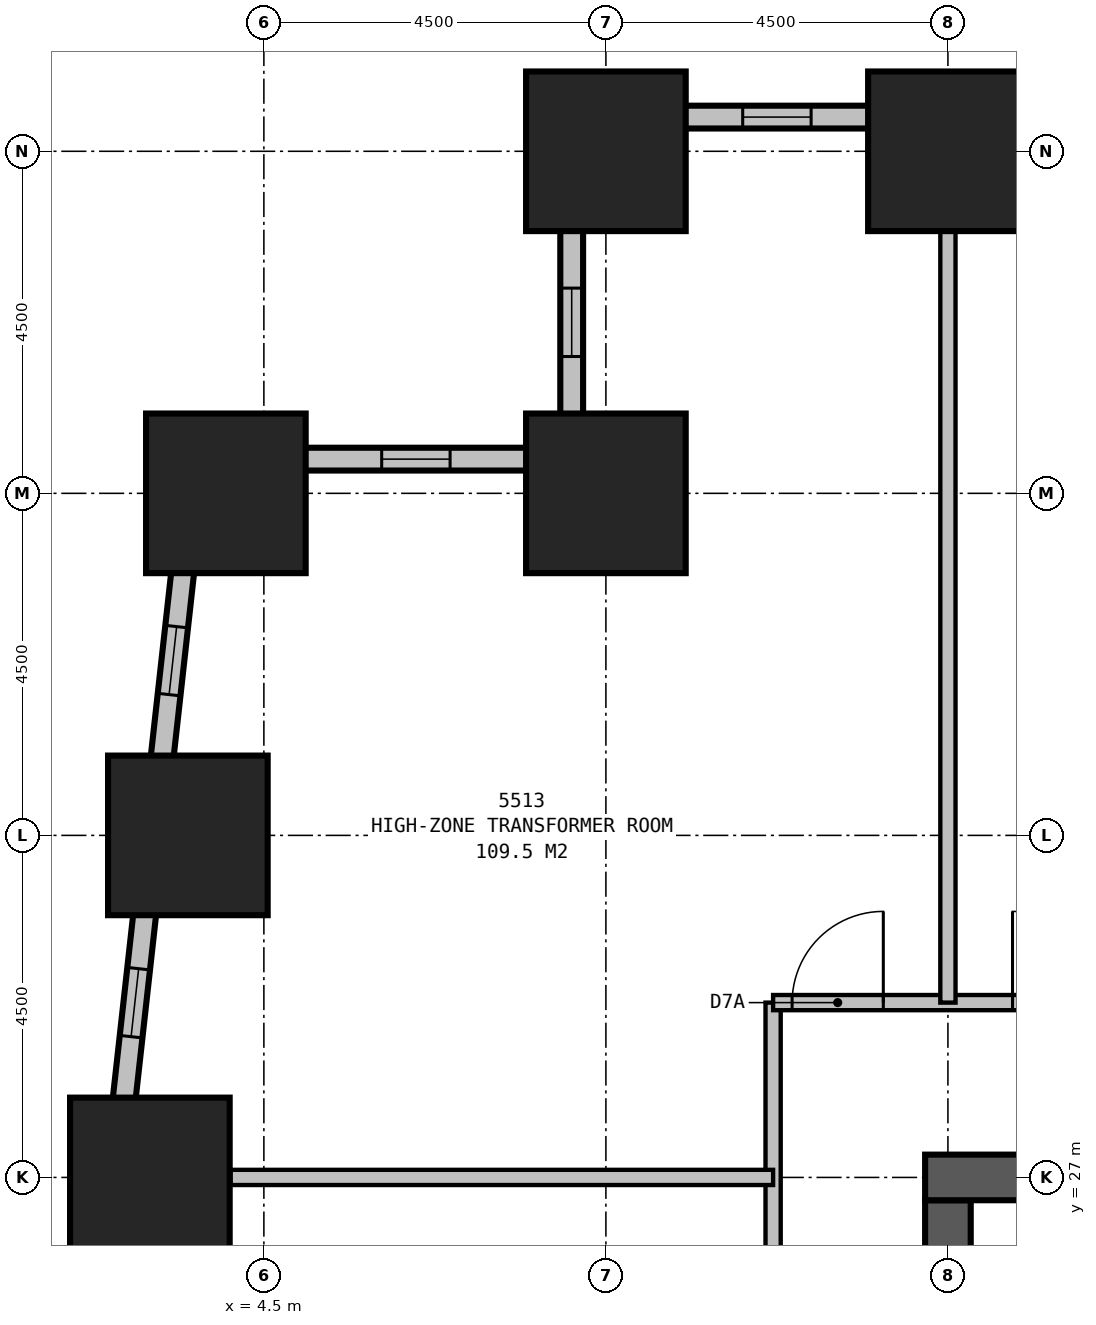
"""IFC4 building model, lengths in metres.
Left out: names, types, materials, properties, quantities, classifications, styles, units other than length and angle.
Written with IfcOpenShell. Run it as: python <this file> out.ifc"""

import sys

from ifc_helpers import new_model, si_unit, direction, frame, frame_2d, origin, origin_2d, place, context, subcontext, project, spatial, rectangle, extrude, element, fill, save


model = new_model("IFC4")
c1 = context("Model", 3, precision=1e-05, world=origin(), true_north=direction((0.0, 1.0)))
c2 = subcontext(c1, "Body", "Model", "MODEL_VIEW")
j1 = project(units=[si_unit("LENGTHUNIT", "METRE"), si_unit("PLANEANGLEUNIT", "RADIAN")], contexts=[c1])
p1 = place(None, origin())
s1 = spatial("IfcSite", under=j1, at=p1, CompositionType="ELEMENT")
p2 = place(p1, origin())
s2 = spatial("IfcBuilding", under=s1, at=p2, CompositionType="ELEMENT")
p3 = place(p2, frame((0.0, 0.0, 211.4)))
s3 = spatial("IfcBuildingStorey", under=s2, at=p3, CompositionType="ELEMENT", Elevation=211.4)
for number, where, z_axis, x_axis in (
    (1, (13.5, 40.5, 0.0), (0.0, 0.0, 1.0), (1.0, 0.0, 0.0)),
    (2, (9.0, 40.5, 0.0), (0.0, 0.0, 1.0), (1.0, 0.0, 0.0)),
    (3, (9.0, 36.0, 0.0), (0.0, 0.0, 1.0), (1.0, 0.0, 0.0)),
    (4, (4.0, 36.0, 0.0), (0.0, 0.0, 1.0), (1.0, 0.0, 0.0)),
    (5, (3.5, 31.5, 0.0), (0.0, 0.0, 1.0), (1.0, 0.0, 0.0)),
    (6, (3.0, 27.0, 0.0), (0.0, 0.0, 1.0), (1.0, 0.0, 0.0)),
):
    element("IfcColumn", number, at=place(p3, frame(where, z_axis=z_axis, x_axis=x_axis)), inside=s3, PredefinedType="COLUMN", context=c2, shape_type="SweptSolid", body=[
        extrude(rectangle(XDim=2.1, YDim=2.1, at=origin_2d()), origin(), (0.0, 0.0, 1.0), 6.0),
    ])
p4 = place(p3, frame((36.3, 27.0, 0.0), z_axis=(0.0, 0.0, 1.0), x_axis=(-1.0, 0.0, 0.0)))
e7 = element("IfcWall", 7, at=p4, inside=s3, PredefinedType="SHEAR", context=c2, shape_type="SweptSolid", body=[
    extrude(rectangle(XDim=23.1, YDim=0.6, at=frame_2d((11.55, 0.0))), origin(), (0.0, 0.0, 1.0), 6.0),
])
p5 = place(p4, frame((17.05, 0.0, 0.0)))
e8 = element("IfcOpeningElement", 8, at=p5, cuts=e7, PredefinedType="OPENING", context=c2, shape_type="SweptSolid", body=[
    extrude(rectangle(XDim=1.0, YDim=2.1, at=frame_2d((0.5, 1.05))), frame((0.0, 0.31, 0.0), z_axis=(0.0, -1.0, 0.0), x_axis=(1.0, 0.0, 0.0)), (0.0, 0.0, 1.0), 0.62),
])
p6 = place(p4, frame((12.05, 0.0, 0.0)))
e9 = element("IfcOpeningElement", 9, at=p6, cuts=e7, PredefinedType="OPENING", context=c2, shape_type="SweptSolid", body=[
    extrude(rectangle(XDim=1.0, YDim=2.1, at=frame_2d((0.5, 1.05))), frame((0.0, 0.31, 0.0), z_axis=(0.0, -1.0, 0.0), x_axis=(1.0, 0.0, 0.0)), (0.0, 0.0, 1.0), 0.62),
])
p7 = place(p4, frame((7.05, 0.0, 0.0)))
e10 = element("IfcOpeningElement", 10, at=p7, cuts=e7, PredefinedType="OPENING", context=c2, shape_type="SweptSolid", body=[
    extrude(rectangle(XDim=1.0, YDim=2.1, at=frame_2d((0.5, 1.05))), frame((0.0, 0.31, 0.0), z_axis=(0.0, -1.0, 0.0), x_axis=(1.0, 0.0, 0.0)), (0.0, 0.0, 1.0), 0.62),
])
p8 = place(p3, frame((13.5, 26.7, 0.0), z_axis=(0.0, 0.0, 1.0), x_axis=(0.0, -1.0, 0.0)))
e11 = element("IfcWall", 11, at=p8, inside=s3, PredefinedType="SHEAR", context=c2, shape_type="SweptSolid", body=[
    extrude(rectangle(XDim=6.7, YDim=0.6, at=frame_2d((3.35, 0.0))), origin(), (0.0, 0.0, 1.0), 6.0),
])
p9 = place(p3, frame((41.1, 40.95, 0.0), z_axis=(0.0, 0.0, 1.0), x_axis=(-1.0, 0.0, 0.0)))
e12 = element("IfcWall", 12, at=p9, inside=s3, PredefinedType="STANDARD", context=c2, shape_type="SweptSolid", body=[
    extrude(rectangle(XDim=32.7, YDim=0.3, at=frame_2d((16.35, 0.0))), origin(), (0.0, 0.0, 1.0), 4.6),
])
p10 = place(p9, frame((2.4, 0.0, 0.5)))
e13 = element("IfcOpeningElement", 13, at=p10, cuts=e12, PredefinedType="OPENING", context=c2, shape_type="SweptSolid", body=[
    extrude(rectangle(XDim=0.9, YDim=1.2, at=frame_2d((0.45, 0.6))), frame((0.0, 0.16, 0.0), z_axis=(0.0, -1.0, 0.0), x_axis=(1.0, 0.0, 0.0)), (0.0, 0.0, 1.0), 0.32),
])
p11 = place(p9, frame((6.9, 0.0, 0.5)))
e14 = element("IfcOpeningElement", 14, at=p11, cuts=e12, PredefinedType="OPENING", context=c2, shape_type="SweptSolid", body=[
    extrude(rectangle(XDim=0.9, YDim=1.2, at=frame_2d((0.45, 0.6))), frame((0.0, 0.16, 0.0), z_axis=(0.0, -1.0, 0.0), x_axis=(1.0, 0.0, 0.0)), (0.0, 0.0, 1.0), 0.32),
])
p12 = place(p9, frame((11.4, 0.0, 0.5)))
e15 = element("IfcOpeningElement", 15, at=p12, cuts=e12, PredefinedType="OPENING", context=c2, shape_type="SweptSolid", body=[
    extrude(rectangle(XDim=0.9, YDim=1.2, at=frame_2d((0.45, 0.6))), frame((0.0, 0.16, 0.0), z_axis=(0.0, -1.0, 0.0), x_axis=(1.0, 0.0, 0.0)), (0.0, 0.0, 1.0), 0.32),
])
p13 = place(p9, frame((15.9, 0.0, 0.5)))
e16 = element("IfcOpeningElement", 16, at=p13, cuts=e12, PredefinedType="OPENING", context=c2, shape_type="SweptSolid", body=[
    extrude(rectangle(XDim=0.9, YDim=1.2, at=frame_2d((0.45, 0.6))), frame((0.0, 0.16, 0.0), z_axis=(0.0, -1.0, 0.0), x_axis=(1.0, 0.0, 0.0)), (0.0, 0.0, 1.0), 0.32),
])
p14 = place(p9, frame((20.4, 0.0, 0.5)))
e17 = element("IfcOpeningElement", 17, at=p14, cuts=e12, PredefinedType="OPENING", context=c2, shape_type="SweptSolid", body=[
    extrude(rectangle(XDim=0.9, YDim=1.2, at=frame_2d((0.45, 0.6))), frame((0.0, 0.16, 0.0), z_axis=(0.0, -1.0, 0.0), x_axis=(1.0, 0.0, 0.0)), (0.0, 0.0, 1.0), 0.32),
])
p15 = place(p9, frame((24.9, 0.0, 0.5)))
e18 = element("IfcOpeningElement", 18, at=p15, cuts=e12, PredefinedType="OPENING", context=c2, shape_type="SweptSolid", body=[
    extrude(rectangle(XDim=0.9, YDim=1.2, at=frame_2d((0.45, 0.6))), frame((0.0, 0.16, 0.0), z_axis=(0.0, -1.0, 0.0), x_axis=(1.0, 0.0, 0.0)), (0.0, 0.0, 1.0), 0.32),
])
p16 = place(p9, frame((29.4, 0.0, 0.5)))
e19 = element("IfcOpeningElement", 19, at=p16, cuts=e12, PredefinedType="OPENING", context=c2, shape_type="SweptSolid", body=[
    extrude(rectangle(XDim=0.9, YDim=1.2, at=frame_2d((0.45, 0.6))), frame((0.0, 0.16, 0.0), z_axis=(0.0, -1.0, 0.0), x_axis=(1.0, 0.0, 0.0)), (0.0, 0.0, 1.0), 0.32),
])
p17 = place(p3, frame((8.55, 41.1, 0.0), z_axis=(0.0, 0.0, 1.0), x_axis=(0.0, -1.0, 0.0)))
e20 = element("IfcWall", 20, at=p17, inside=s3, PredefinedType="STANDARD", context=c2, shape_type="SweptSolid", body=[
    extrude(rectangle(XDim=4.8, YDim=0.3, at=frame_2d((2.4, 0.0))), origin(), (0.0, 0.0, 1.0), 4.6),
])
p18 = place(p17, frame((2.4, 0.0, 0.5)))
e21 = element("IfcOpeningElement", 21, at=p18, cuts=e20, PredefinedType="OPENING", context=c2, shape_type="SweptSolid", body=[
    extrude(rectangle(XDim=0.9, YDim=1.2, at=frame_2d((0.45, 0.6))), frame((0.0, 0.16, 0.0), z_axis=(0.0, -1.0, 0.0), x_axis=(1.0, 0.0, 0.0)), (0.0, 0.0, 1.0), 0.32),
])
p19 = place(p3, frame((8.7, 36.45, 0.0), z_axis=(0.0, 0.0, 1.0), x_axis=(-1.0, 0.0, 0.0)))
e22 = element("IfcWall", 22, at=p19, inside=s3, PredefinedType="STANDARD", context=c2, shape_type="SweptSolid", body=[
    extrude(rectangle(XDim=5.253, YDim=0.3, at=frame_2d((2.626, 0.0))), origin(), (0.0, 0.0, 1.0), 4.6),
])
p20 = place(p19, frame((1.75, 0.0, 0.5)))
e23 = element("IfcOpeningElement", 23, at=p20, cuts=e22, PredefinedType="OPENING", context=c2, shape_type="SweptSolid", body=[
    extrude(rectangle(XDim=0.9, YDim=1.2, at=frame_2d((0.45, 0.6))), frame((0.0, 0.16, 0.0), z_axis=(0.0, -1.0, 0.0), x_axis=(1.0, 0.0, 0.0)), (0.0, 0.0, 1.0), 0.32),
])
p21 = place(p3, frame((3.614, 36.599, 0.0), z_axis=(0.0, 0.0, 1.0), x_axis=(-0.11042815468, -0.993884109267, 0.0)))
e24 = element("IfcWall", 24, at=p21, inside=s3, PredefinedType="STANDARD", context=c2, shape_type="SweptSolid", body=[
    extrude(rectangle(XDim=23.844, YDim=0.3, at=frame_2d((11.922, 0.0))), origin(), (0.0, 0.0, 1.0), 4.6),
])
p22 = place(p21, frame((2.367, 0.0, 0.5)))
e25 = element("IfcOpeningElement", 25, at=p22, cuts=e24, PredefinedType="OPENING", context=c2, shape_type="SweptSolid", body=[
    extrude(rectangle(XDim=0.9, YDim=1.2, at=frame_2d((0.45, 0.6))), frame((0.0, 0.16, 0.0), z_axis=(0.0, -1.0, 0.0), x_axis=(1.0, 0.0, 0.0)), (0.0, 0.0, 1.0), 0.32),
])
p23 = place(p21, frame((6.895, 0.0, 0.5)))
e26 = element("IfcOpeningElement", 26, at=p23, cuts=e24, PredefinedType="OPENING", context=c2, shape_type="SweptSolid", body=[
    extrude(rectangle(XDim=0.9, YDim=1.2, at=frame_2d((0.45, 0.6))), frame((0.0, 0.16, 0.0), z_axis=(0.0, -1.0, 0.0), x_axis=(1.0, 0.0, 0.0)), (0.0, 0.0, 1.0), 0.32),
])
p24 = place(p21, frame((11.422, 0.0, 0.5)))
e27 = element("IfcOpeningElement", 27, at=p24, cuts=e24, PredefinedType="OPENING", context=c2, shape_type="SweptSolid", body=[
    extrude(rectangle(XDim=0.9, YDim=1.2, at=frame_2d((0.45, 0.6))), frame((0.0, 0.16, 0.0), z_axis=(0.0, -1.0, 0.0), x_axis=(1.0, 0.0, 0.0)), (0.0, 0.0, 1.0), 0.32),
])
p25 = place(p21, frame((15.95, 0.0, 0.5)))
e28 = element("IfcOpeningElement", 28, at=p25, cuts=e24, PredefinedType="OPENING", context=c2, shape_type="SweptSolid", body=[
    extrude(rectangle(XDim=0.9, YDim=1.2, at=frame_2d((0.45, 0.6))), frame((0.0, 0.16, 0.0), z_axis=(0.0, -1.0, 0.0), x_axis=(1.0, 0.0, 0.0)), (0.0, 0.0, 1.0), 0.32),
])
p26 = place(p21, frame((20.478, 0.0, 0.5)))
e29 = element("IfcOpeningElement", 29, at=p26, cuts=e24, PredefinedType="OPENING", context=c2, shape_type="SweptSolid", body=[
    extrude(rectangle(XDim=0.9, YDim=1.2, at=frame_2d((0.45, 0.6))), frame((0.0, 0.16, 0.0), z_axis=(0.0, -1.0, 0.0), x_axis=(1.0, 0.0, 0.0)), (0.0, 0.0, 1.0), 0.32),
])
p27 = place(p3, frame((11.2, 29.3, 0.0), z_axis=(0.0, 0.0, 1.0), x_axis=(1.0, 0.0, 0.0)))
e30 = element("IfcWall", 30, at=p27, inside=s3, PredefinedType="PARTITIONING", context=c2, shape_type="SweptSolid", body=[
    extrude(rectangle(XDim=27.1, YDim=0.2, at=frame_2d((13.55, 0.0))), origin(), (0.0, 0.0, 1.0), 5.75),
])
p28 = place(p27, frame((3.15, 0.0, 0.0)))
e31 = element("IfcOpeningElement", 31, at=p28, cuts=e30, PredefinedType="OPENING", context=c2, shape_type="SweptSolid", body=[
    extrude(rectangle(XDim=1.2, YDim=2.1, at=frame_2d((0.6, 1.05))), frame((0.0, 0.11, 0.0), z_axis=(0.0, -1.0, 0.0), x_axis=(1.0, 0.0, 0.0)), (0.0, 0.0, 1.0), 0.22),
])
p29 = place(p27, frame((16.25, 0.0, 0.0)))
e32 = element("IfcOpeningElement", 32, at=p29, cuts=e30, PredefinedType="OPENING", context=c2, shape_type="SweptSolid", body=[
    extrude(rectangle(XDim=1.2, YDim=2.1, at=frame_2d((0.6, 1.05))), frame((0.0, 0.11, 0.0), z_axis=(0.0, -1.0, 0.0), x_axis=(1.0, 0.0, 0.0)), (0.0, 0.0, 1.0), 0.22),
])
p30 = place(p27, frame((0.25, 0.0, 0.0)))
e33 = element("IfcOpeningElement", 33, at=p30, cuts=e30, PredefinedType="OPENING", context=c2, shape_type="SweptSolid", body=[
    extrude(rectangle(XDim=1.2, YDim=2.1, at=frame_2d((0.6, 1.05))), frame((0.0, 0.11, 0.0), z_axis=(0.0, -1.0, 0.0), x_axis=(1.0, 0.0, 0.0)), (0.0, 0.0, 1.0), 0.22),
])
p31 = place(p27, frame((25.35, 0.0, 0.0)))
e34 = element("IfcOpeningElement", 34, at=p31, cuts=e30, PredefinedType="OPENING", context=c2, shape_type="SweptSolid", body=[
    extrude(rectangle(XDim=1.2, YDim=2.1, at=frame_2d((0.6, 1.05))), frame((0.0, 0.11, 0.0), z_axis=(0.0, -1.0, 0.0), x_axis=(1.0, 0.0, 0.0)), (0.0, 0.0, 1.0), 0.22),
])
p32 = place(p3, frame((11.2, 11.2, 0.0), z_axis=(0.0, 0.0, 1.0), x_axis=(0.0, 1.0, 0.0)))
e35 = element("IfcWall", 35, at=p32, inside=s3, PredefinedType="PARTITIONING", context=c2, shape_type="SweptSolid", body=[
    extrude(rectangle(XDim=18.1, YDim=0.2, at=frame_2d((9.05, 0.0))), origin(), (0.0, 0.0, 1.0), 5.75),
])
p33 = place(p32, frame((3.35, 0.0, 0.0)))
e36 = element("IfcOpeningElement", 36, at=p33, cuts=e35, PredefinedType="OPENING", context=c2, shape_type="SweptSolid", body=[
    extrude(rectangle(XDim=1.0, YDim=2.1, at=frame_2d((0.5, 1.05))), frame((0.0, 0.11, 0.0), z_axis=(0.0, -1.0, 0.0), x_axis=(1.0, 0.0, 0.0)), (0.0, 0.0, 1.0), 0.22),
])
p34 = place(p32, frame((7.25, 0.0, 0.0)))
e37 = element("IfcOpeningElement", 37, at=p34, cuts=e35, PredefinedType="OPENING", context=c2, shape_type="SweptSolid", body=[
    extrude(rectangle(XDim=1.2, YDim=2.1, at=frame_2d((0.6, 1.05))), frame((0.0, 0.11, 0.0), z_axis=(0.0, -1.0, 0.0), x_axis=(1.0, 0.0, 0.0)), (0.0, 0.0, 1.0), 0.22),
])
p35 = place(p3, frame((13.5, 29.3, 0.0), z_axis=(0.0, 0.0, 1.0), x_axis=(0.0, 1.0, 0.0)))
e38 = element("IfcWall", 38, at=p35, inside=s3, PredefinedType="PARTITIONING", context=c2, shape_type="SweptSolid", body=[
    extrude(rectangle(XDim=10.15, YDim=0.2, at=frame_2d((5.075, 0.0))), origin(), (0.0, 0.0, 1.0), 1.85),
])
p36 = place(p3, frame((11.2, 27.0, 0.0), z_axis=(0.0, 0.0, 1.0), x_axis=(-1.0, 0.0, 0.0)))
e39 = element("IfcWall", 39, at=p36, inside=s3, PredefinedType="PARTITIONING", context=c2, shape_type="SweptSolid", body=[
    extrude(rectangle(XDim=7.139, YDim=0.2, at=frame_2d((3.57, 0.0))), origin(), (0.0, 0.0, 1.0), 1.55),
])
p37 = place(p16, origin())
e40 = element("IfcWindow", 40, at=p37, inside=s3, PartitioningType="SINGLE_PANEL", PredefinedType="USERDEFINED", context=c2, shape_type="SweptSolid", body=[
    extrude(rectangle(XDim=0.9, YDim=1.2, at=frame_2d((0.45, 0.6))), frame((0.0, 0.03, 0.0), z_axis=(0.0, -1.0, 0.0), x_axis=(1.0, 0.0, 0.0)), (0.0, 0.0, 1.0), 0.06),
])
fill(e19, e40)
p38 = place(p18, origin())
e41 = element("IfcWindow", 41, at=p38, inside=s3, PartitioningType="SINGLE_PANEL", PredefinedType="USERDEFINED", context=c2, shape_type="SweptSolid", body=[
    extrude(rectangle(XDim=0.9, YDim=1.2, at=frame_2d((0.45, 0.6))), frame((0.0, 0.03, 0.0), z_axis=(0.0, -1.0, 0.0), x_axis=(1.0, 0.0, 0.0)), (0.0, 0.0, 1.0), 0.06),
])
fill(e21, e41)
p39 = place(p20, origin())
e42 = element("IfcWindow", 42, at=p39, inside=s3, PartitioningType="SINGLE_PANEL", PredefinedType="USERDEFINED", context=c2, shape_type="SweptSolid", body=[
    extrude(rectangle(XDim=0.9, YDim=1.2, at=frame_2d((0.45, 0.6))), frame((0.0, 0.03, 0.0), z_axis=(0.0, -1.0, 0.0), x_axis=(1.0, 0.0, 0.0)), (0.0, 0.0, 1.0), 0.06),
])
fill(e23, e42)
p40 = place(p22, origin())
e43 = element("IfcWindow", 43, at=p40, inside=s3, PartitioningType="SINGLE_PANEL", PredefinedType="USERDEFINED", context=c2, shape_type="SweptSolid", body=[
    extrude(rectangle(XDim=0.9, YDim=1.2, at=frame_2d((0.45, 0.6))), frame((0.0, 0.03, 0.0), z_axis=(0.0, -1.0, 0.0), x_axis=(1.0, 0.0, 0.0)), (0.0, 0.0, 1.0), 0.06),
])
fill(e25, e43)
p41 = place(p23, origin())
e44 = element("IfcWindow", 44, at=p41, inside=s3, PartitioningType="SINGLE_PANEL", PredefinedType="USERDEFINED", context=c2, shape_type="SweptSolid", body=[
    extrude(rectangle(XDim=0.9, YDim=1.2, at=frame_2d((0.45, 0.6))), frame((0.0, 0.03, 0.0), z_axis=(0.0, -1.0, 0.0), x_axis=(1.0, 0.0, 0.0)), (0.0, 0.0, 1.0), 0.06),
])
fill(e26, e44)
p42 = place(p28, origin())
e45 = element("IfcDoor", 45, at=p42, inside=s3, OperationType="SINGLE_SWING_LEFT", PredefinedType="DOOR", context=c2, shape_type="SweptSolid", body=[
    extrude(rectangle(XDim=1.2, YDim=2.1, at=frame_2d((0.6, 1.05))), frame((0.0, 0.025, 0.0), z_axis=(0.0, -1.0, 0.0), x_axis=(1.0, 0.0, 0.0)), (0.0, 0.0, 1.0), 0.05),
])
fill(e31, e45)
p43 = place(p30, origin())
e46 = element("IfcDoor", 46, at=p43, inside=s3, OperationType="SINGLE_SWING_RIGHT", PredefinedType="DOOR", context=c2, shape_type="SweptSolid", body=[
    extrude(rectangle(XDim=1.2, YDim=2.1, at=frame_2d((0.6, 1.05))), frame((0.0, 0.025, 0.0), z_axis=(0.0, -1.0, 0.0), x_axis=(1.0, 0.0, 0.0)), (0.0, 0.0, 1.0), 0.05),
])
fill(e33, e46)
save(model, sys.argv[1])
